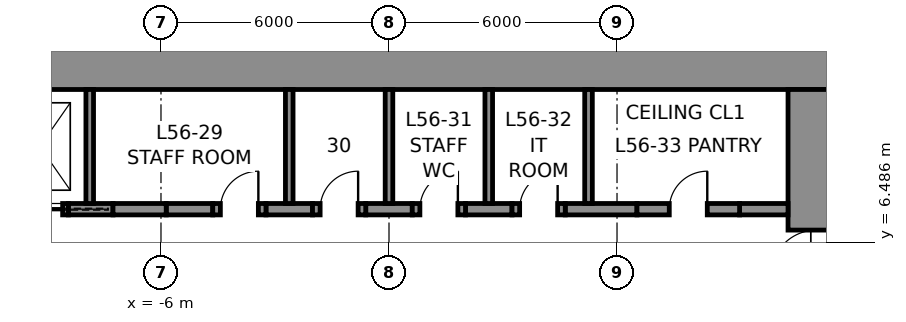
"""IFC4 building model, lengths in metres.
Left out: names, types, materials, properties, quantities, classifications, styles, units other than length and angle.
Written with IfcOpenShell. Run it as: python <this file> out.ifc"""

import sys

from ifc_helpers import new_model, si_unit, direction, frame, frame_2d, origin, place, context, subcontext, project, spatial, rectangle, extrude, element, fill, save


model = new_model("IFC4")
c1 = context("Model", 3, precision=1e-05, world=origin(), true_north=direction((0.0, 1.0)))
c2 = subcontext(c1, "Body", "Model", "MODEL_VIEW")
j1 = project(units=[si_unit("LENGTHUNIT", "METRE"), si_unit("PLANEANGLEUNIT", "RADIAN")], contexts=[c1])
p1 = place(None, origin())
s1 = spatial("IfcSite", under=j1, at=p1, CompositionType="ELEMENT")
p2 = place(p1, origin())
s2 = spatial("IfcBuilding", under=s1, at=p2, CompositionType="ELEMENT")
p3 = place(p2, frame((0.0, 0.0, 253.8)))
s3 = spatial("IfcBuildingStorey", under=s2, at=p3, CompositionType="ELEMENT", Elevation=253.8)
p4 = place(p3, frame((-12.0, 11.25, 0.0), z_axis=(0.0, 0.0, 1.0), x_axis=(1.0, 0.0, 0.0)))
e1 = element("IfcWall", 1, at=p4, inside=s3, PredefinedType="SHEAR", context=c2, shape_type="SweptSolid", body=[
    extrude(rectangle(XDim=24.0, YDim=1.5, at=frame_2d((12.0, 0.0))), origin(), (0.0, 0.0, 1.0), 4.0),
])
p5 = place(p3, frame((11.25, 10.5, 0.0), z_axis=(0.0, 0.0, 1.0), x_axis=(0.0, -1.0, 0.0)))
e2 = element("IfcWall", 2, at=p5, inside=s3, PredefinedType="SHEAR", context=c2, shape_type="SweptSolid", body=[
    extrude(rectangle(XDim=21.0, YDim=1.5, at=frame_2d((10.5, 0.0))), origin(), (0.0, 0.0, 1.0), 4.0),
])
p6 = place(p5, frame((3.7, 0.0, 0.0)))
e3 = element("IfcOpeningElement", 3, at=p6, cuts=e2, PredefinedType="OPENING", context=c2, shape_type="SweptSolid", body=[
    extrude(rectangle(XDim=1.2, YDim=2.3, at=frame_2d((0.6, 1.15))), frame((0.0, 0.76, 0.0), z_axis=(0.0, -1.0, 0.0), x_axis=(1.0, 0.0, 0.0)), (0.0, 0.0, 1.0), 1.52),
])
p7 = place(p5, frame((16.1, 0.0, 0.0)))
e4 = element("IfcOpeningElement", 4, at=p7, cuts=e2, PredefinedType="OPENING", context=c2, shape_type="SweptSolid", body=[
    extrude(rectangle(XDim=1.2, YDim=2.3, at=frame_2d((0.6, 1.15))), frame((0.0, 0.76, 0.0), z_axis=(0.0, -1.0, 0.0), x_axis=(1.0, 0.0, 0.0)), (0.0, 0.0, 1.0), 1.52),
])
p8 = place(p3, frame((-8.438, 7.35, 0.0), z_axis=(0.0, 0.0, 1.0), x_axis=(1.0, 0.0, 0.0)))
e5 = element("IfcWall", 5, at=p8, inside=s3, PredefinedType="SHEAR", context=c2, shape_type="SweptSolid", body=[
    extrude(rectangle(XDim=1.175, YDim=0.3, at=frame_2d((0.587, 0.0))), origin(), (0.0, 0.0, 1.0), 4.0),
])
for number, where, z_axis, x_axis in (
    (6, (-5.863, 7.35, 0.0), (0.0, 0.0, 1.0), (1.0, 0.0, 0.0)),
    (7, (-3.238, 7.35, 0.0), (0.0, 0.0, 1.0), (1.0, 0.0, 0.0)),
    (8, (-0.613, 7.35, 0.0), (0.0, 0.0, 1.0), (1.0, 0.0, 0.0)),
    (9, (2.012, 7.35, 0.0), (0.0, 0.0, 1.0), (1.0, 0.0, 0.0)),
):
    element("IfcWall", number, at=place(p3, frame(where, z_axis=z_axis, x_axis=x_axis)), inside=s3, PredefinedType="SHEAR", context=c2, shape_type="SweptSolid", body=[
        extrude(rectangle(XDim=1.225, YDim=0.3, at=frame_2d((0.613, 0.0))), origin(), (0.0, 0.0, 1.0), 4.0),
    ])
p9 = place(p3, frame((4.637, 7.35, 0.0), z_axis=(0.0, 0.0, 1.0), x_axis=(1.0, 0.0, 0.0)))
e10 = element("IfcWall", 10, at=p9, inside=s3, PredefinedType="SHEAR", context=c2, shape_type="SweptSolid", body=[
    extrude(rectangle(XDim=1.887, YDim=0.3, at=frame_2d((0.944, 0.0))), origin(), (0.0, 0.0, 1.0), 4.0),
])
p10 = place(p3, frame((9.225, 7.35, 0.0), z_axis=(0.0, 0.0, 1.0), x_axis=(1.0, 0.0, 0.0)))
e11 = element("IfcWall", 11, at=p10, inside=s3, PredefinedType="SHEAR", context=c2, shape_type="SweptSolid", body=[
    extrude(rectangle(XDim=1.275, YDim=0.3, at=frame_2d((0.637, 0.0))), origin(), (0.0, 0.0, 1.0), 4.0),
])
p11 = place(p3, frame((-9.938, 7.35, 0.0), z_axis=(0.0, 0.0, 1.0), x_axis=(1.0, 0.0, 0.0)))
e12 = element("IfcWall", 12, at=p11, inside=s3, PredefinedType="PARTITIONING", context=c2, shape_type="SweptSolid", body=[
    extrude(rectangle(XDim=1.5, YDim=0.3, at=frame_2d((0.75, 0.0))), origin(), (0.0, 0.0, 1.0), 4.0),
])
p12 = place(p11, frame((0.15, 0.0, 0.0)))
e13 = element("IfcOpeningElement", 13, at=p12, cuts=e12, PredefinedType="OPENING", context=c2, shape_type="SweptSolid", body=[
    extrude(rectangle(XDim=1.2, YDim=2.3, at=frame_2d((0.6, 1.15))), frame((0.0, 0.16, 0.0), z_axis=(0.0, -1.0, 0.0), x_axis=(1.0, 0.0, 0.0)), (0.0, 0.0, 1.0), 0.32),
])
p13 = place(p3, frame((-7.262, 7.35, 0.0), z_axis=(0.0, 0.0, 1.0), x_axis=(1.0, 0.0, 0.0)))
e14 = element("IfcWall", 14, at=p13, inside=s3, PredefinedType="PARTITIONING", context=c2, shape_type="SweptSolid", body=[
    extrude(rectangle(XDim=1.4, YDim=0.3, at=frame_2d((0.7, 0.0))), origin(), (0.0, 0.0, 1.0), 4.0),
])
p14 = place(p3, frame((-4.637, 7.35, 0.0), z_axis=(0.0, 0.0, 1.0), x_axis=(1.0, 0.0, 0.0)))
e15 = element("IfcWall", 15, at=p14, inside=s3, PredefinedType="PARTITIONING", context=c2, shape_type="SweptSolid", body=[
    extrude(rectangle(XDim=1.4, YDim=0.3, at=frame_2d((0.7, 0.0))), origin(), (0.0, 0.0, 1.0), 4.0),
])
p15 = place(p14, frame((0.2, 0.0, 0.0)))
e16 = element("IfcOpeningElement", 16, at=p15, cuts=e15, PredefinedType="OPENING", context=c2, shape_type="SweptSolid", body=[
    extrude(rectangle(XDim=1.0, YDim=2.3, at=frame_2d((0.5, 1.15))), frame((0.0, 0.16, 0.0), z_axis=(0.0, -1.0, 0.0), x_axis=(1.0, 0.0, 0.0)), (0.0, 0.0, 1.0), 0.32),
])
p16 = place(p3, frame((-2.012, 7.35, 0.0), z_axis=(0.0, 0.0, 1.0), x_axis=(1.0, 0.0, 0.0)))
e17 = element("IfcWall", 17, at=p16, inside=s3, PredefinedType="PARTITIONING", context=c2, shape_type="SweptSolid", body=[
    extrude(rectangle(XDim=1.4, YDim=0.3, at=frame_2d((0.7, 0.0))), origin(), (0.0, 0.0, 1.0), 4.0),
])
p17 = place(p16, frame((0.2, 0.0, 0.0)))
e18 = element("IfcOpeningElement", 18, at=p17, cuts=e17, PredefinedType="OPENING", context=c2, shape_type="SweptSolid", body=[
    extrude(rectangle(XDim=1.0, YDim=2.3, at=frame_2d((0.5, 1.15))), frame((0.0, 0.16, 0.0), z_axis=(0.0, -1.0, 0.0), x_axis=(1.0, 0.0, 0.0)), (0.0, 0.0, 1.0), 0.32),
])
p18 = place(p3, frame((0.613, 7.35, 0.0), z_axis=(0.0, 0.0, 1.0), x_axis=(1.0, 0.0, 0.0)))
e19 = element("IfcWall", 19, at=p18, inside=s3, PredefinedType="PARTITIONING", context=c2, shape_type="SweptSolid", body=[
    extrude(rectangle(XDim=1.4, YDim=0.3, at=frame_2d((0.7, 0.0))), origin(), (0.0, 0.0, 1.0), 4.0),
])
p19 = place(p18, frame((0.2, 0.0, 0.0)))
e20 = element("IfcOpeningElement", 20, at=p19, cuts=e19, PredefinedType="OPENING", context=c2, shape_type="SweptSolid", body=[
    extrude(rectangle(XDim=1.0, YDim=2.3, at=frame_2d((0.5, 1.15))), frame((0.0, 0.16, 0.0), z_axis=(0.0, -1.0, 0.0), x_axis=(1.0, 0.0, 0.0)), (0.0, 0.0, 1.0), 0.32),
])
p20 = place(p3, frame((3.238, 7.35, 0.0), z_axis=(0.0, 0.0, 1.0), x_axis=(1.0, 0.0, 0.0)))
e21 = element("IfcWall", 21, at=p20, inside=s3, PredefinedType="PARTITIONING", context=c2, shape_type="SweptSolid", body=[
    extrude(rectangle(XDim=1.4, YDim=0.3, at=frame_2d((0.7, 0.0))), origin(), (0.0, 0.0, 1.0), 4.0),
])
p21 = place(p20, frame((0.2, 0.0, 0.0)))
e22 = element("IfcOpeningElement", 22, at=p21, cuts=e21, PredefinedType="OPENING", context=c2, shape_type="SweptSolid", body=[
    extrude(rectangle(XDim=1.0, YDim=2.3, at=frame_2d((0.5, 1.15))), frame((0.0, 0.16, 0.0), z_axis=(0.0, -1.0, 0.0), x_axis=(1.0, 0.0, 0.0)), (0.0, 0.0, 1.0), 0.32),
])
p22 = place(p3, frame((6.525, 7.35, 0.0), z_axis=(0.0, 0.0, 1.0), x_axis=(1.0, 0.0, 0.0)))
e23 = element("IfcWall", 23, at=p22, inside=s3, PredefinedType="PARTITIONING", context=c2, shape_type="SweptSolid", body=[
    extrude(rectangle(XDim=2.7, YDim=0.3, at=frame_2d((1.35, 0.0))), origin(), (0.0, 0.0, 1.0), 4.0),
])
p23 = place(p22, frame((0.85, 0.0, 0.0)))
e24 = element("IfcOpeningElement", 24, at=p23, cuts=e23, PredefinedType="OPENING", context=c2, shape_type="SweptSolid", body=[
    extrude(rectangle(XDim=1.0, YDim=2.3, at=frame_2d((0.5, 1.15))), frame((0.0, 0.16, 0.0), z_axis=(0.0, -1.0, 0.0), x_axis=(1.0, 0.0, 0.0)), (0.0, 0.0, 1.0), 0.32),
])
for number, where, z_axis, x_axis in (
    (25, (-7.875, 7.5, 0.0), (0.0, 0.0, 1.0), (0.0, 1.0, 0.0)),
    (26, (-2.625, 7.5, 0.0), (0.0, 0.0, 1.0), (0.0, 1.0, 0.0)),
    (27, (0.0, 7.5, 0.0), (0.0, 0.0, 1.0), (0.0, 1.0, 0.0)),
    (28, (2.625, 7.5, 0.0), (0.0, 0.0, 1.0), (0.0, 1.0, 0.0)),
    (29, (5.25, 7.5, 0.0), (0.0, 0.0, 1.0), (0.0, 1.0, 0.0)),
):
    element("IfcWall", number, at=place(p3, frame(where, z_axis=z_axis, x_axis=x_axis)), inside=s3, PredefinedType="PARTITIONING", context=c2, shape_type="SweptSolid", body=[
        extrude(rectangle(XDim=3.0, YDim=0.2, at=frame_2d((1.5, 0.0))), origin(), (0.0, 0.0, 1.0), 4.0),
    ])
p24 = place(p15, origin())
e30 = element("IfcDoor", 30, at=p24, inside=s3, OperationType="SINGLE_SWING_RIGHT", PredefinedType="DOOR", context=c2, shape_type="SweptSolid", body=[
    extrude(rectangle(XDim=1.0, YDim=2.3, at=frame_2d((0.5, 1.15))), frame((0.0, 0.025, 0.0), z_axis=(0.0, -1.0, 0.0), x_axis=(1.0, 0.0, 0.0)), (0.0, 0.0, 1.0), 0.05),
])
fill(e16, e30)
p25 = place(p17, origin())
e31 = element("IfcDoor", 31, at=p25, inside=s3, OperationType="SINGLE_SWING_RIGHT", PredefinedType="DOOR", context=c2, shape_type="SweptSolid", body=[
    extrude(rectangle(XDim=1.0, YDim=2.3, at=frame_2d((0.5, 1.15))), frame((0.0, 0.025, 0.0), z_axis=(0.0, -1.0, 0.0), x_axis=(1.0, 0.0, 0.0)), (0.0, 0.0, 1.0), 0.05),
])
fill(e18, e31)
p26 = place(p19, origin())
e32 = element("IfcDoor", 32, at=p26, inside=s3, OperationType="SINGLE_SWING_RIGHT", PredefinedType="DOOR", context=c2, shape_type="SweptSolid", body=[
    extrude(rectangle(XDim=1.0, YDim=2.3, at=frame_2d((0.5, 1.15))), frame((0.0, 0.025, 0.0), z_axis=(0.0, -1.0, 0.0), x_axis=(1.0, 0.0, 0.0)), (0.0, 0.0, 1.0), 0.05),
])
fill(e20, e32)
p27 = place(p21, origin())
e33 = element("IfcDoor", 33, at=p27, inside=s3, OperationType="SINGLE_SWING_RIGHT", PredefinedType="DOOR", context=c2, shape_type="SweptSolid", body=[
    extrude(rectangle(XDim=1.0, YDim=2.3, at=frame_2d((0.5, 1.15))), frame((0.0, 0.025, 0.0), z_axis=(0.0, -1.0, 0.0), x_axis=(1.0, 0.0, 0.0)), (0.0, 0.0, 1.0), 0.05),
])
fill(e22, e33)
p28 = place(p23, origin())
e34 = element("IfcDoor", 34, at=p28, inside=s3, OperationType="SINGLE_SWING_RIGHT", PredefinedType="DOOR", context=c2, shape_type="SweptSolid", body=[
    extrude(rectangle(XDim=1.0, YDim=2.3, at=frame_2d((0.5, 1.15))), frame((0.0, 0.025, 0.0), z_axis=(0.0, -1.0, 0.0), x_axis=(1.0, 0.0, 0.0)), (0.0, 0.0, 1.0), 0.05),
])
fill(e24, e34)
p29 = place(p6, frame((1.2, 0.0, 0.0), z_axis=(0.0, 0.0, 1.0), x_axis=(-1.0, 0.0, 0.0)))
e35 = element("IfcDoor", 35, at=p29, inside=s3, OperationType="SINGLE_SWING_LEFT", PredefinedType="DOOR", context=c2, shape_type="SweptSolid", body=[
    extrude(rectangle(XDim=1.2, YDim=2.3, at=frame_2d((0.6, 1.15))), frame((0.0, 0.025, 0.0), z_axis=(0.0, -1.0, 0.0), x_axis=(1.0, 0.0, 0.0)), (0.0, 0.0, 1.0), 0.05),
])
fill(e3, e35)
p30 = place(p12, frame((1.2, 0.0, 0.0), z_axis=(0.0, 0.0, 1.0), x_axis=(-1.0, 0.0, 0.0)))
e36 = element("IfcDoor", 36, at=p30, inside=s3, OperationType="SLIDING_TO_LEFT", PredefinedType="DOOR", context=c2, shape_type="SweptSolid", body=[
    extrude(rectangle(XDim=1.2, YDim=2.3, at=frame_2d((0.6, 1.15))), frame((0.0, 0.025, 0.0), z_axis=(0.0, -1.0, 0.0), x_axis=(1.0, 0.0, 0.0)), (0.0, 0.0, 1.0), 0.05),
])
fill(e13, e36)
save(model, sys.argv[1])
